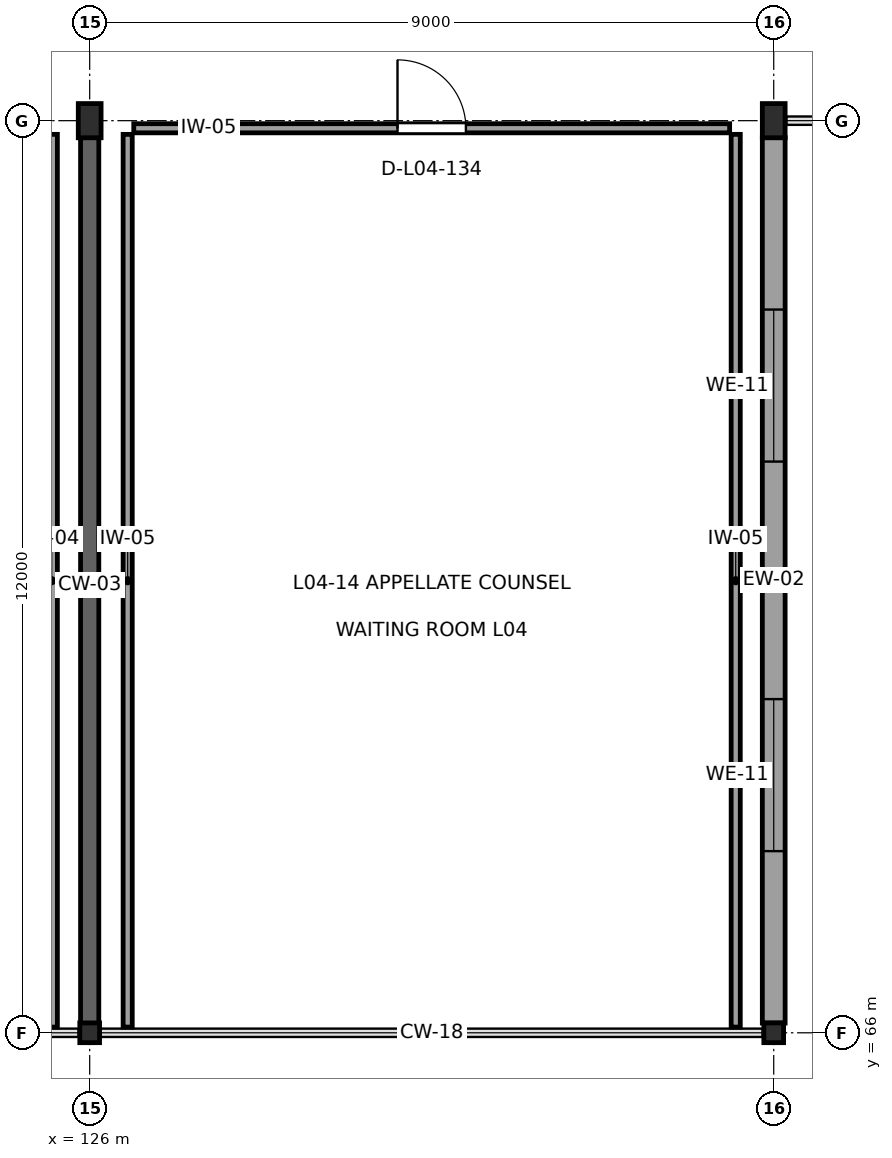
"""IFC4 building model, lengths in metres.
Left out: names, types, materials, properties, quantities, classifications, styles, units other than length and angle.
Written with IfcOpenShell. Run it as: python <this file> out.ifc"""

import sys

from ifc_helpers import new_model, si_unit, direction, frame, frame_2d, origin, origin_2d, place, context, subcontext, project, spatial, rectangle, i_section, extrude, element, fill, save


model = new_model("IFC4")
c1 = context("Model", 3, precision=1e-05, world=origin(), true_north=direction((0.0, 1.0)))
c2 = subcontext(c1, "Body", "Model", "MODEL_VIEW")
j1 = project(units=[si_unit("LENGTHUNIT", "METRE"), si_unit("PLANEANGLEUNIT", "RADIAN")], contexts=[c1])
p1 = place(None, origin())
s1 = spatial("IfcSite", under=j1, at=p1, CompositionType="ELEMENT")
p2 = place(p1, origin())
s2 = spatial("IfcBuilding", under=s1, at=p2, CompositionType="ELEMENT")
p3 = place(p2, frame((0.0, 0.0, 18.9)))
s3 = spatial("IfcBuildingStorey", under=s2, at=p3, CompositionType="ELEMENT", Elevation=18.9)
p4 = place(p3, frame((126.0, 66.0, 0.0), z_axis=(0.0, 0.0, 1.0), x_axis=(0.0, 1.0, 0.0)))
e1 = element("IfcColumn", 1, at=p4, inside=s3, PredefinedType="COLUMN", context=c2, shape_type="SweptSolid", body=[
    extrude(i_section(OverallWidth=0.26, OverallDepth=0.26, WebThickness=0.01, FlangeThickness=0.018, at=origin_2d()), origin(), (0.0, 0.0, 1.0), 4.3),
])
p5 = place(p3, frame((126.0, 78.0, 0.0), z_axis=(0.0, 0.0, 1.0), x_axis=(1.0, 0.0, 0.0)))
e2 = element("IfcColumn", 2, at=p5, inside=s3, PredefinedType="COLUMN", context=c2, shape_type="SweptSolid", body=[
    extrude(i_section(OverallWidth=0.3, OverallDepth=0.45, WebThickness=0.014, FlangeThickness=0.026, at=origin_2d()), origin(), (0.0, 0.0, 1.0), 4.3),
])
p6 = place(p3, frame((135.0, 66.0, 0.0), z_axis=(0.0, 0.0, 1.0), x_axis=(1.0, 0.0, 0.0)))
e3 = element("IfcColumn", 3, at=p6, inside=s3, PredefinedType="COLUMN", context=c2, shape_type="SweptSolid", body=[
    extrude(i_section(OverallWidth=0.26, OverallDepth=0.26, WebThickness=0.01, FlangeThickness=0.018, at=origin_2d()), origin(), (0.0, 0.0, 1.0), 4.3),
])
p7 = place(p3, frame((135.0, 78.0, 0.0), z_axis=(0.0, 0.0, 1.0), x_axis=(1.0, 0.0, 0.0)))
e4 = element("IfcColumn", 4, at=p7, inside=s3, PredefinedType="COLUMN", context=c2, shape_type="SweptSolid", body=[
    extrude(i_section(OverallWidth=0.3, OverallDepth=0.45, WebThickness=0.014, FlangeThickness=0.026, at=origin_2d()), origin(), (0.0, 0.0, 1.0), 4.3),
])
p8 = place(p3, frame((135.0, 66.128, 0.0), z_axis=(0.0, 0.0, 1.0), x_axis=(0.0, 1.0, 0.0)))
e5 = element("IfcWall", 5, at=p8, inside=s3, PredefinedType="SOLIDWALL", context=c2, shape_type="SweptSolid", body=[
    extrude(rectangle(XDim=11.649, YDim=0.3, at=frame_2d((5.825, 0.0))), origin(), (0.0, 0.0, 1.0), 3.855),
])
p9 = place(p8, frame((2.262, 0.0, 0.85)))
e6 = element("IfcOpeningElement", 6, at=p9, cuts=e5, PredefinedType="OPENING", context=c2, shape_type="SweptSolid", body=[
    extrude(rectangle(XDim=2.0, YDim=2.0, at=frame_2d((1.0, 1.0))), frame((0.0, 0.165, 0.0), z_axis=(0.0, -1.0, 0.0), x_axis=(1.0, 0.0, 0.0)), (0.0, 0.0, 1.0), 0.33),
])
p10 = place(p8, frame((7.387, 0.0, 0.85)))
e7 = element("IfcOpeningElement", 7, at=p10, cuts=e5, PredefinedType="OPENING", context=c2, shape_type="SweptSolid", body=[
    extrude(rectangle(XDim=2.0, YDim=2.0, at=frame_2d((1.0, 1.0))), frame((0.0, 0.165, 0.0), z_axis=(0.0, -1.0, 0.0), x_axis=(1.0, 0.0, 0.0)), (0.0, 0.0, 1.0), 0.33),
])
p11 = place(p3, frame((126.0, 66.008, 0.0), z_axis=(0.0, 0.0, 1.0), x_axis=(0.0, 1.0, 0.0)))
e8 = element("IfcWall", 8, at=p11, inside=s3, PredefinedType="SHEAR", context=c2, shape_type="SweptSolid", body=[
    extrude(rectangle(XDim=11.769, YDim=0.24, at=frame_2d((5.885, 0.0))), origin(), (0.0, 0.0, 1.0), 3.905),
])
p12 = place(p3, frame((125.5, 77.82, 0.0), z_axis=(0.0, 0.0, 1.0), x_axis=(0.0, -1.0, 0.0)))
e9 = element("IfcWall", 9, at=p12, inside=s3, PredefinedType="PARTITIONING", context=c2, shape_type="SweptSolid", body=[
    extrude(rectangle(XDim=11.745, YDim=0.15, at=frame_2d((5.873, 0.0))), origin(), (0.0, 0.0, 1.0), 4.14),
])
p13 = place(p3, frame((126.5, 66.075, 0.0), z_axis=(0.0, 0.0, 1.0), x_axis=(0.0, 1.0, 0.0)))
e10 = element("IfcWall", 10, at=p13, inside=s3, PredefinedType="PARTITIONING", context=c2, shape_type="SweptSolid", body=[
    extrude(rectangle(XDim=11.745, YDim=0.12, at=frame_2d((5.873, 0.0))), origin(), (0.0, 0.0, 1.0), 4.14),
])
p14 = place(p3, frame((126.58, 77.9, 0.0), z_axis=(0.0, 0.0, 1.0), x_axis=(1.0, 0.0, 0.0)))
e11 = element("IfcWall", 11, at=p14, inside=s3, PredefinedType="PARTITIONING", context=c2, shape_type="SweptSolid", body=[
    extrude(rectangle(XDim=7.84, YDim=0.12, at=frame_2d((3.92, 0.0))), origin(), (0.0, 0.0, 1.0), 3.705),
])
p15 = place(p14, frame((3.47, 0.0, 0.0)))
e12 = element("IfcOpeningElement", 12, at=p15, cuts=e11, PredefinedType="OPENING", context=c2, shape_type="SweptSolid", body=[
    extrude(rectangle(XDim=0.9, YDim=2.1, at=frame_2d((0.45, 1.05))), frame((0.0, 0.075, 0.0), z_axis=(0.0, -1.0, 0.0), x_axis=(1.0, 0.0, 0.0)), (0.0, 0.0, 1.0), 0.15),
])
p16 = place(p3, frame((134.5, 77.82, 0.0), z_axis=(0.0, 0.0, 1.0), x_axis=(0.0, -1.0, 0.0)))
e13 = element("IfcWall", 13, at=p16, inside=s3, PredefinedType="PARTITIONING", context=c2, shape_type="SweptSolid", body=[
    extrude(rectangle(XDim=11.745, YDim=0.12, at=frame_2d((5.873, 0.0))), origin(), (0.0, 0.0, 1.0), 4.14),
])
p17 = place(p9, origin())
e14 = element("IfcWindow", 14, at=p17, inside=s3, PartitioningType="SINGLE_PANEL", PredefinedType="WINDOW", context=c2, shape_type="SweptSolid", body=[
    extrude(rectangle(XDim=2.0, YDim=2.0, at=frame_2d((1.0, 1.0))), frame((0.0, 0.03, 0.0), z_axis=(0.0, -1.0, 0.0), x_axis=(1.0, 0.0, 0.0)), (0.0, 0.0, 1.0), 0.06),
])
fill(e6, e14)
p18 = place(p10, origin())
e15 = element("IfcWindow", 15, at=p18, inside=s3, PartitioningType="SINGLE_PANEL", PredefinedType="WINDOW", context=c2, shape_type="SweptSolid", body=[
    extrude(rectangle(XDim=2.0, YDim=2.0, at=frame_2d((1.0, 1.0))), frame((0.0, 0.03, 0.0), z_axis=(0.0, -1.0, 0.0), x_axis=(1.0, 0.0, 0.0)), (0.0, 0.0, 1.0), 0.06),
])
fill(e7, e15)
p19 = place(p15, origin())
e16 = element("IfcDoor", 16, at=p19, inside=s3, OperationType="SINGLE_SWING_LEFT", PredefinedType="DOOR", context=c2, shape_type="SweptSolid", body=[
    extrude(rectangle(XDim=0.9, YDim=2.1, at=frame_2d((0.45, 1.05))), frame((0.0, 0.025, 0.0), z_axis=(0.0, -1.0, 0.0), x_axis=(1.0, 0.0, 0.0)), (0.0, 0.0, 1.0), 0.05),
])
fill(e12, e16)
save(model, sys.argv[1])
